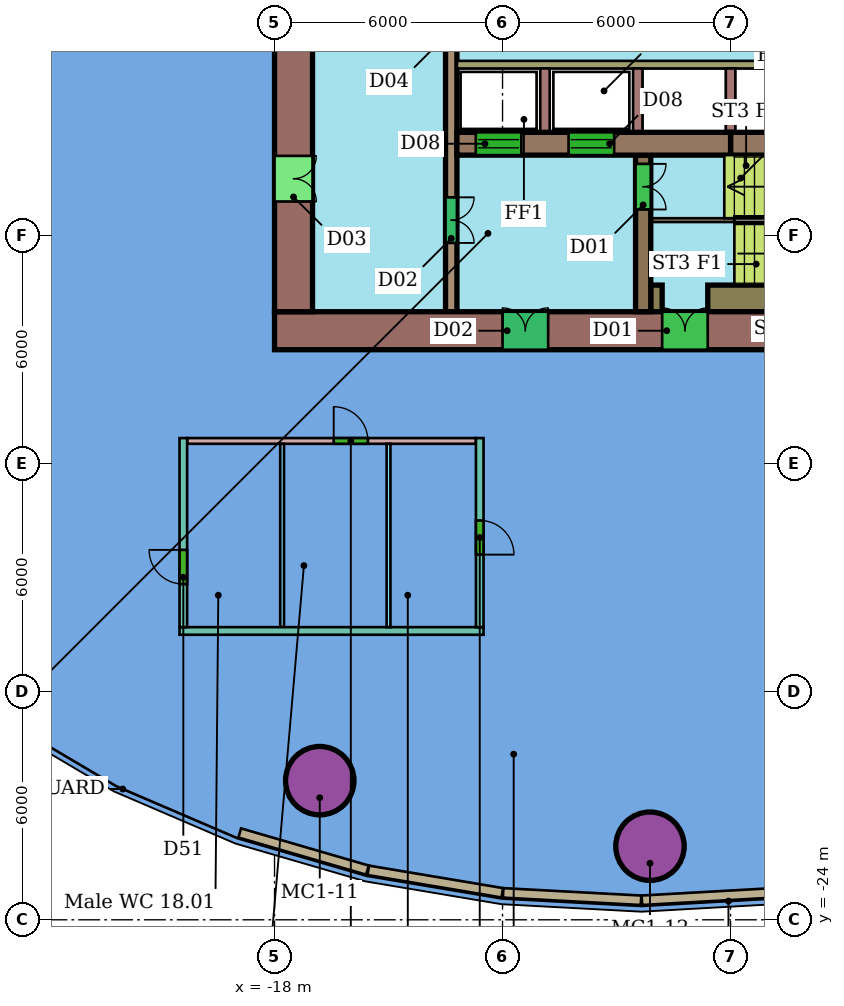
"""IFC4 building model, lengths in metres.
Left out: names, types, materials, properties, quantities, classifications, styles, units other than length and angle.
Written with IfcOpenShell. Run it as: python <this file> out.ifc"""

import sys

from ifc_helpers import new_model, si_unit, direction, frame, frame_2d, origin, origin_2d, place, context, subcontext, project, spatial, rectangle, hollow_circle, extrude, element, fill, save


model = new_model("IFC4")
c1 = context("Model", 3, precision=1e-05, world=origin(), true_north=direction((0.0, 1.0)))
c2 = subcontext(c1, "Body", "Model", "MODEL_VIEW")
j1 = project(units=[si_unit("LENGTHUNIT", "METRE"), si_unit("PLANEANGLEUNIT", "RADIAN")], contexts=[c1])
p1 = place(None, origin())
s1 = spatial("IfcSite", under=j1, at=p1, CompositionType="ELEMENT")
p2 = place(p1, origin())
s2 = spatial("IfcBuilding", under=s1, at=p2, CompositionType="ELEMENT")
p3 = place(p2, frame((0.0, 0.0, 84.1)))
s3 = spatial("IfcBuildingStorey", under=s2, at=p3, CompositionType="ELEMENT", Elevation=84.1)
for number, where, z_axis, x_axis in (
    (1, (-16.81, -20.339, 0.0), (0.0, 0.0, 1.0), (1.0, 0.0, 0.0)),
    (2, (-8.121, -22.064, 0.0), (0.0, 0.0, 1.0), (1.0, 0.0, 0.0)),
):
    element("IfcColumn", number, at=place(p3, frame(where, z_axis=z_axis, x_axis=x_axis)), inside=s3, PredefinedType="COLUMN", context=c2, shape_type="SweptSolid", body=[
        extrude(hollow_circle(Radius=0.9, WallThickness=0.06, at=origin_2d()), origin(), (0.0, 0.0, 1.0), 4.35),
    ])
p4 = place(p3, frame((-20.3, -11.4, 0.0), z_axis=(0.0, 0.0, 1.0), x_axis=(1.0, 0.0, 0.0)))
e3 = element("IfcWall", 3, at=p4, inside=s3, PredefinedType="PARTITIONING", context=c2, shape_type="SweptSolid", body=[
    extrude(rectangle(XDim=7.6, YDim=0.15, at=frame_2d((3.8, 0.0))), origin(), (0.0, 0.0, 1.0), 3.65),
])
p5 = place(p4, frame((3.857, 0.0, 0.0)))
e4 = element("IfcOpeningElement", 4, at=p5, cuts=e3, PredefinedType="OPENING", context=c2, shape_type="SweptSolid", body=[
    extrude(rectangle(XDim=0.9, YDim=2.1, at=frame_2d((0.45, 1.05))), frame((0.0, 0.085, 0.0), z_axis=(0.0, -1.0, 0.0), x_axis=(1.0, 0.0, 0.0)), (0.0, 0.0, 1.0), 0.17),
])
p6 = place(p3, frame((-17.8, -16.3, 0.0), z_axis=(0.0, 0.0, 1.0), x_axis=(0.0, 1.0, 0.0)))
e5 = element("IfcWall", 5, at=p6, inside=s3, PredefinedType="PARTITIONING", context=c2, shape_type="SweptSolid", body=[
    extrude(rectangle(XDim=4.825, YDim=0.1, at=frame_2d((2.413, 0.0))), origin(), (0.0, 0.0, 1.0), 3.65),
])
p7 = place(p3, frame((-20.5, -16.4, 0.0), z_axis=(0.0, 0.0, 1.0), x_axis=(1.0, 0.0, 0.0)))
e6 = element("IfcWall", 6, at=p7, inside=s3, PredefinedType="PARTITIONING", context=c2, shape_type="SweptSolid", body=[
    extrude(rectangle(XDim=8.0, YDim=0.2, at=frame_2d((4.0, 0.0))), origin(), (0.0, 0.0, 1.0), 3.65),
])
p8 = place(p3, frame((-20.4, -16.3, 0.0), z_axis=(0.0, 0.0, 1.0), x_axis=(0.0, 1.0, 0.0)))
e7 = element("IfcWall", 7, at=p8, inside=s3, PredefinedType="PARTITIONING", context=c2, shape_type="SweptSolid", body=[
    extrude(rectangle(XDim=4.975, YDim=0.2, at=frame_2d((2.488, 0.0))), origin(), (0.0, 0.0, 1.0), 3.65),
])
p9 = place(p8, frame((1.133, 0.0, 0.0)))
e8 = element("IfcOpeningElement", 8, at=p9, cuts=e7, PredefinedType="OPENING", context=c2, shape_type="SweptSolid", body=[
    extrude(rectangle(XDim=0.9, YDim=2.1, at=frame_2d((0.45, 1.05))), frame((0.0, 0.11, 0.0), z_axis=(0.0, -1.0, 0.0), x_axis=(1.0, 0.0, 0.0)), (0.0, 0.0, 1.0), 0.22),
])
p10 = place(p3, frame((-15.0, -16.3, 0.0), z_axis=(0.0, 0.0, 1.0), x_axis=(0.0, 1.0, 0.0)))
e9 = element("IfcWall", 9, at=p10, inside=s3, PredefinedType="PARTITIONING", context=c2, shape_type="SweptSolid", body=[
    extrude(rectangle(XDim=4.825, YDim=0.1, at=frame_2d((2.413, 0.0))), origin(), (0.0, 0.0, 1.0), 3.65),
])
p11 = place(p3, frame((-12.6, -11.325, 0.0), z_axis=(0.0, 0.0, 1.0), x_axis=(0.0, -1.0, 0.0)))
e10 = element("IfcWall", 10, at=p11, inside=s3, PredefinedType="PARTITIONING", context=c2, shape_type="SweptSolid", body=[
    extrude(rectangle(XDim=4.975, YDim=0.2, at=frame_2d((2.488, 0.0))), origin(), (0.0, 0.0, 1.0), 3.65),
])
p12 = place(p11, frame((2.167, 0.0, 0.0)))
e11 = element("IfcOpeningElement", 11, at=p12, cuts=e10, PredefinedType="OPENING", context=c2, shape_type="SweptSolid", body=[
    extrude(rectangle(XDim=0.9, YDim=2.1, at=frame_2d((0.45, 1.05))), frame((0.0, 0.11, 0.0), z_axis=(0.0, -1.0, 0.0), x_axis=(1.0, 0.0, 0.0)), (0.0, 0.0, 1.0), 0.22),
])
p13 = place(p3, frame((-18.915, -21.715, 0.0), z_axis=(0.0, 0.0, 1.0), x_axis=(0.960188833613, -0.279351756401, 0.0)))
e12 = element("IfcWall", 12, at=p13, inside=s3, PredefinedType="SOLIDWALL", context=c2, shape_type="SweptSolid", body=[
    extrude(rectangle(XDim=3.5, YDim=0.25, at=frame_2d((1.75, 0.0))), origin(), (0.0, 0.0, 1.0), 3.95),
])
p14 = place(p3, frame((-15.532, -22.698, 0.0), z_axis=(0.0, 0.0, 1.0), x_axis=(0.986227312358, -0.165395551207, 0.0)))
e13 = element("IfcWall", 13, at=p14, inside=s3, PredefinedType="SOLIDWALL", context=c2, shape_type="SweptSolid", body=[
    extrude(rectangle(XDim=3.575, YDim=0.25, at=frame_2d((1.788, 0.0))), origin(), (0.0, 0.0, 1.0), 3.95),
])
p15 = place(p3, frame((-11.985, -23.292, 0.0), z_axis=(0.0, 0.0, 1.0), x_axis=(0.998569925552, -0.053461236262, 0.0)))
e14 = element("IfcWall", 14, at=p15, inside=s3, PredefinedType="SOLIDWALL", context=c2, shape_type="SweptSolid", body=[
    extrude(rectangle(XDim=3.635, YDim=0.25, at=frame_2d((1.817, 0.0))), origin(), (0.0, 0.0, 1.0), 3.95),
])
p16 = place(p3, frame((-8.333, -23.486, 0.0), z_axis=(0.0, 0.0, 1.0), x_axis=(0.998420665682, 0.056179839253, 0.0)))
e15 = element("IfcWall", 15, at=p16, inside=s3, PredefinedType="SOLIDWALL", context=c2, shape_type="SweptSolid", body=[
    extrude(rectangle(XDim=3.677, YDim=0.25, at=frame_2d((1.838, 0.0))), origin(), (0.0, 0.0, 1.0), 3.95),
])
p17 = place(p3, frame((-18.0, -8.5, 0.0), z_axis=(0.0, 0.0, 1.0), x_axis=(1.0, 0.0, 0.0)))
e16 = element("IfcWall", 16, at=p17, inside=s3, PredefinedType="SHEAR", context=c2, shape_type="SweptSolid", body=[
    extrude(rectangle(XDim=24.0, YDim=1.0, at=frame_2d((12.0, 0.0))), origin(), (0.0, 0.0, 1.0), 4.2),
])
p18 = place(p17, frame((10.2, 0.0, 0.0)))
e17 = element("IfcOpeningElement", 17, at=p18, cuts=e16, PredefinedType="OPENING", context=c2, shape_type="SweptSolid", body=[
    extrude(rectangle(XDim=1.2, YDim=2.1, at=frame_2d((0.6, 1.05))), frame((0.0, 0.51, 0.0), z_axis=(0.0, -1.0, 0.0), x_axis=(1.0, 0.0, 0.0)), (0.0, 0.0, 1.0), 1.02),
])
p19 = place(p17, frame((6.0, 0.0, 0.0)))
e18 = element("IfcOpeningElement", 18, at=p19, cuts=e16, PredefinedType="OPENING", context=c2, shape_type="SweptSolid", body=[
    extrude(rectangle(XDim=1.2, YDim=2.1, at=frame_2d((0.6, 1.05))), frame((0.0, 0.51, 0.0), z_axis=(0.0, -1.0, 0.0), x_axis=(1.0, 0.0, 0.0)), (0.0, 0.0, 1.0), 1.02),
])
p20 = place(p3, frame((-17.5, 8.0, 0.0), z_axis=(0.0, 0.0, 1.0), x_axis=(0.0, -1.0, 0.0)))
e19 = element("IfcWall", 19, at=p20, inside=s3, PredefinedType="SHEAR", context=c2, shape_type="SweptSolid", body=[
    extrude(rectangle(XDim=16.0, YDim=1.0, at=frame_2d((8.0, 0.0))), origin(), (0.0, 0.0, 1.0), 4.2),
])
p21 = place(p20, frame((11.9, 0.0, 0.0)))
e20 = element("IfcOpeningElement", 20, at=p21, cuts=e19, PredefinedType="OPENING", context=c2, shape_type="SweptSolid", body=[
    extrude(rectangle(XDim=1.2, YDim=2.1, at=frame_2d((0.6, 1.05))), frame((0.0, 0.51, 0.0), z_axis=(0.0, -1.0, 0.0), x_axis=(1.0, 0.0, 0.0)), (0.0, 0.0, 1.0), 1.02),
])
p22 = place(p20, frame((2.9, 0.0, 0.0)))
e21 = element("IfcOpeningElement", 21, at=p22, cuts=e19, PredefinedType="OPENING", context=c2, shape_type="SweptSolid", body=[
    extrude(rectangle(XDim=1.2, YDim=2.1, at=frame_2d((0.6, 1.05))), frame((0.0, 0.51, 0.0), z_axis=(0.0, -1.0, 0.0), x_axis=(1.0, 0.0, 0.0)), (0.0, 0.0, 1.0), 1.02),
])
p23 = place(p3, frame((-13.2, -3.58, 0.0), z_axis=(0.0, 0.0, 1.0), x_axis=(1.0, 0.0, 0.0)))
e22 = element("IfcWall", 22, at=p23, inside=s3, PredefinedType="SHEAR", context=c2, shape_type="SweptSolid", body=[
    extrude(rectangle(XDim=7.2, YDim=0.6, at=frame_2d((3.6, 0.0))), origin(), (0.0, 0.0, 1.0), 4.2),
])
p24 = place(p23, frame((0.496, 0.0, 0.0)))
e23 = element("IfcOpeningElement", 23, at=p24, cuts=e22, PredefinedType="OPENING", context=c2, shape_type="SweptSolid", body=[
    extrude(rectangle(XDim=1.2, YDim=2.1, at=frame_2d((0.6, 1.05))), frame((0.0, 0.31, 0.0), z_axis=(0.0, -1.0, 0.0), x_axis=(1.0, 0.0, 0.0)), (0.0, 0.0, 1.0), 0.62),
])
p25 = place(p23, frame((2.938, 0.0, 0.0)))
e24 = element("IfcOpeningElement", 24, at=p25, cuts=e22, PredefinedType="OPENING", context=c2, shape_type="SweptSolid", body=[
    extrude(rectangle(XDim=1.2, YDim=2.1, at=frame_2d((0.6, 1.05))), frame((0.0, 0.31, 0.0), z_axis=(0.0, -1.0, 0.0), x_axis=(1.0, 0.0, 0.0)), (0.0, 0.0, 1.0), 0.62),
])
p26 = place(p3, frame((-6.0, -3.58, 0.0), z_axis=(0.0, 0.0, 1.0), x_axis=(1.0, 0.0, 0.0)))
e25 = element("IfcWall", 25, at=p26, inside=s3, PredefinedType="SHEAR", context=c2, shape_type="SweptSolid", body=[
    extrude(rectangle(XDim=7.2, YDim=0.6, at=frame_2d((3.6, 0.0))), origin(), (0.0, 0.0, 1.0), 4.2),
])
p27 = place(p3, frame((-13.35, 8.0, 0.0), z_axis=(0.0, 0.0, 1.0), x_axis=(0.0, -1.0, 0.0)))
e26 = element("IfcWall", 26, at=p27, inside=s3, PredefinedType="SHEAR", context=c2, shape_type="SweptSolid", body=[
    extrude(rectangle(XDim=16.0, YDim=0.3, at=frame_2d((8.0, 0.0))), origin(), (0.0, 0.0, 1.0), 4.2),
])
p28 = place(p27, frame((2.69, 0.0, 0.0)))
e27 = element("IfcOpeningElement", 27, at=p28, cuts=e26, PredefinedType="OPENING", context=c2, shape_type="SweptSolid", body=[
    extrude(rectangle(XDim=1.2, YDim=2.1, at=frame_2d((0.6, 1.05))), frame((0.0, 0.16, 0.0), z_axis=(0.0, -1.0, 0.0), x_axis=(1.0, 0.0, 0.0)), (0.0, 0.0, 1.0), 0.32),
])
p29 = place(p27, frame((12.99, 0.0, 0.0)))
e28 = element("IfcOpeningElement", 28, at=p29, cuts=e26, PredefinedType="OPENING", context=c2, shape_type="SweptSolid", body=[
    extrude(rectangle(XDim=1.2, YDim=2.1, at=frame_2d((0.6, 1.05))), frame((0.0, 0.16, 0.0), z_axis=(0.0, -1.0, 0.0), x_axis=(1.0, 0.0, 0.0)), (0.0, 0.0, 1.0), 0.32),
])
p30 = place(p27, frame((7.25, 0.0, 0.0)))
e29 = element("IfcOpeningElement", 29, at=p30, cuts=e26, PredefinedType="OPENING", context=c2, shape_type="SweptSolid", body=[
    extrude(rectangle(XDim=1.5, YDim=2.1, at=frame_2d((0.75, 1.05))), frame((0.0, 0.16, 0.0), z_axis=(0.0, -1.0, 0.0), x_axis=(1.0, 0.0, 0.0)), (0.0, 0.0, 1.0), 0.32),
])
p31 = place(p3, frame((1.2, -1.5, 0.0), z_axis=(0.0, 0.0, 1.0), x_axis=(-1.0, 0.0, 0.0)))
e30 = element("IfcWall", 30, at=p31, inside=s3, PredefinedType="SHEAR", context=c2, shape_type="SweptSolid", body=[
    extrude(rectangle(XDim=14.4, YDim=0.2, at=frame_2d((7.2, 0.0))), origin(), (0.0, 0.0, 1.0), 4.2),
])
p32 = place(p31, frame((0.15, 0.0, 0.0)))
e31 = element("IfcOpeningElement", 31, at=p32, cuts=e30, PredefinedType="OPENING", context=c2, shape_type="SweptSolid", body=[
    extrude(rectangle(XDim=1.0, YDim=2.1, at=frame_2d((0.5, 1.05))), frame((0.0, 0.11, 0.0), z_axis=(0.0, -1.0, 0.0), x_axis=(1.0, 0.0, 0.0)), (0.0, 0.0, 1.0), 0.22),
])
p33 = place(p3, frame((-8.3, -3.88, 0.0), z_axis=(0.0, 0.0, 1.0), x_axis=(0.0, -1.0, 0.0)))
e32 = element("IfcWall", 32, at=p33, inside=s3, PredefinedType="SHEAR", context=c2, shape_type="SweptSolid", body=[
    extrude(rectangle(XDim=4.12, YDim=0.4, at=frame_2d((2.06, 0.0))), origin(), (0.0, 0.0, 1.0), 4.2),
])
p34 = place(p33, frame((0.23, 0.0, 0.0)))
e33 = element("IfcOpeningElement", 33, at=p34, cuts=e32, PredefinedType="OPENING", context=c2, shape_type="SweptSolid", body=[
    extrude(rectangle(XDim=1.2, YDim=2.1, at=frame_2d((0.6, 1.05))), frame((0.0, 0.21, 0.0), z_axis=(0.0, -1.0, 0.0), x_axis=(1.0, 0.0, 0.0)), (0.0, 0.0, 1.0), 0.42),
])
p35 = place(p3, frame((-8.1, -7.65, 0.0), z_axis=(0.0, 0.0, 1.0), x_axis=(1.0, 0.0, 0.0)))
e34 = element("IfcWall", 34, at=p35, inside=s3, PredefinedType="SHEAR", context=c2, shape_type="SweptSolid", body=[
    extrude(rectangle(XDim=0.3, YDim=0.7, at=frame_2d((0.15, 0.0))), origin(), (0.0, 0.0, 1.0), 4.2),
])
p36 = place(p3, frame((-6.6, -7.65, 0.0), z_axis=(0.0, 0.0, 1.0), x_axis=(1.0, 0.0, 0.0)))
e35 = element("IfcWall", 35, at=p36, inside=s3, PredefinedType="SHEAR", context=c2, shape_type="SweptSolid", body=[
    extrude(rectangle(XDim=5.55, YDim=0.7, at=frame_2d((2.775, 0.0))), origin(), (0.0, 0.0, 1.0), 4.2),
])
p37 = place(p3, frame((-8.1, -5.59, 0.0), z_axis=(0.0, 0.0, 1.0), x_axis=(1.0, 0.0, 0.0)))
e36 = element("IfcWall", 36, at=p37, inside=s3, PredefinedType="SHEAR", context=c2, shape_type="SweptSolid", body=[
    extrude(rectangle(XDim=2.2, YDim=0.1, at=frame_2d((1.1, 0.0))), origin(), (0.0, 0.0, 1.0), 4.2),
])
for number, where, z_axis, x_axis in (
    (37, (-10.883, -1.6, 0.0), (0.0, 0.0, 1.0), (0.0, -1.0, 0.0)),
    (38, (-8.442, -1.6, 0.0), (0.0, 0.0, 1.0), (0.0, -1.0, 0.0)),
    (39, (-6.0, -1.6, 0.0), (0.0, 0.0, 1.0), (0.0, -1.0, 0.0)),
):
    element("IfcWall", number, at=place(p3, frame(where, z_axis=z_axis, x_axis=x_axis)), inside=s3, PredefinedType="SHEAR", context=c2, shape_type="SweptSolid", body=[
        extrude(rectangle(XDim=1.68, YDim=0.25, at=frame_2d((0.84, 0.0))), origin(), (0.0, 0.0, 1.0), 4.2),
    ])
p38 = place(p5, origin())
e40 = element("IfcDoor", 40, at=p38, inside=s3, OperationType="SINGLE_SWING_LEFT", PredefinedType="DOOR", context=c2, shape_type="SweptSolid", body=[
    extrude(rectangle(XDim=0.9, YDim=2.1, at=frame_2d((0.45, 1.05))), frame((0.0, 0.025, 0.0), z_axis=(0.0, -1.0, 0.0), x_axis=(1.0, 0.0, 0.0)), (0.0, 0.0, 1.0), 0.05),
])
fill(e4, e40)
p39 = place(p9, origin())
e41 = element("IfcDoor", 41, at=p39, inside=s3, OperationType="SINGLE_SWING_RIGHT", PredefinedType="DOOR", context=c2, shape_type="SweptSolid", body=[
    extrude(rectangle(XDim=0.9, YDim=2.1, at=frame_2d((0.45, 1.05))), frame((0.0, 0.025, 0.0), z_axis=(0.0, -1.0, 0.0), x_axis=(1.0, 0.0, 0.0)), (0.0, 0.0, 1.0), 0.05),
])
fill(e8, e41)
p40 = place(p12, origin())
e42 = element("IfcDoor", 42, at=p40, inside=s3, OperationType="SINGLE_SWING_RIGHT", PredefinedType="DOOR", context=c2, shape_type="SweptSolid", body=[
    extrude(rectangle(XDim=0.9, YDim=2.1, at=frame_2d((0.45, 1.05))), frame((0.0, 0.025, 0.0), z_axis=(0.0, -1.0, 0.0), x_axis=(1.0, 0.0, 0.0)), (0.0, 0.0, 1.0), 0.05),
])
fill(e11, e42)
p41 = place(p18, origin())
e43 = element("IfcDoor", 43, at=p41, inside=s3, OperationType="DOUBLE_DOOR_SINGLE_SWING", PredefinedType="NOTDEFINED", context=c2, shape_type="SweptSolid", body=[
    extrude(rectangle(XDim=1.2, YDim=2.1, at=frame_2d((0.6, 1.05))), frame((0.0, 0.025, 0.0), z_axis=(0.0, -1.0, 0.0), x_axis=(1.0, 0.0, 0.0)), (0.0, 0.0, 1.0), 0.05),
])
fill(e17, e43)
p42 = place(p19, origin())
e44 = element("IfcDoor", 44, at=p42, inside=s3, OperationType="DOUBLE_DOOR_SINGLE_SWING", PredefinedType="NOTDEFINED", context=c2, shape_type="SweptSolid", body=[
    extrude(rectangle(XDim=1.2, YDim=2.1, at=frame_2d((0.6, 1.05))), frame((0.0, 0.025, 0.0), z_axis=(0.0, -1.0, 0.0), x_axis=(1.0, 0.0, 0.0)), (0.0, 0.0, 1.0), 0.05),
])
fill(e18, e44)
p43 = place(p21, origin())
e45 = element("IfcDoor", 45, at=p43, inside=s3, OperationType="DOUBLE_DOOR_SINGLE_SWING", PredefinedType="NOTDEFINED", context=c2, shape_type="SweptSolid", body=[
    extrude(rectangle(XDim=1.2, YDim=2.1, at=frame_2d((0.6, 1.05))), frame((0.0, 0.025, 0.0), z_axis=(0.0, -1.0, 0.0), x_axis=(1.0, 0.0, 0.0)), (0.0, 0.0, 1.0), 0.05),
])
fill(e20, e45)
p44 = place(p24, origin())
e46 = element("IfcDoor", 46, at=p44, inside=s3, OperationType="DOUBLE_DOOR_SLIDING", PredefinedType="NOTDEFINED", context=c2, shape_type="SweptSolid", body=[
    extrude(rectangle(XDim=1.2, YDim=2.1, at=frame_2d((0.6, 1.05))), frame((0.0, 0.025, 0.0), z_axis=(0.0, -1.0, 0.0), x_axis=(1.0, 0.0, 0.0)), (0.0, 0.0, 1.0), 0.05),
])
fill(e23, e46)
p45 = place(p25, origin())
e47 = element("IfcDoor", 47, at=p45, inside=s3, OperationType="DOUBLE_DOOR_SLIDING", PredefinedType="NOTDEFINED", context=c2, shape_type="SweptSolid", body=[
    extrude(rectangle(XDim=1.2, YDim=2.1, at=frame_2d((0.6, 1.05))), frame((0.0, 0.025, 0.0), z_axis=(0.0, -1.0, 0.0), x_axis=(1.0, 0.0, 0.0)), (0.0, 0.0, 1.0), 0.05),
])
fill(e24, e47)
p46 = place(p29, origin())
e48 = element("IfcDoor", 48, at=p46, inside=s3, OperationType="DOUBLE_DOOR_SINGLE_SWING", PredefinedType="NOTDEFINED", context=c2, shape_type="SweptSolid", body=[
    extrude(rectangle(XDim=1.2, YDim=2.1, at=frame_2d((0.6, 1.05))), frame((0.0, 0.025, 0.0), z_axis=(0.0, -1.0, 0.0), x_axis=(1.0, 0.0, 0.0)), (0.0, 0.0, 1.0), 0.05),
])
fill(e28, e48)
p47 = place(p34, origin())
e49 = element("IfcDoor", 49, at=p47, inside=s3, OperationType="DOUBLE_DOOR_SINGLE_SWING", PredefinedType="NOTDEFINED", context=c2, shape_type="SweptSolid", body=[
    extrude(rectangle(XDim=1.2, YDim=2.1, at=frame_2d((0.6, 1.05))), frame((0.0, 0.025, 0.0), z_axis=(0.0, -1.0, 0.0), x_axis=(1.0, 0.0, 0.0)), (0.0, 0.0, 1.0), 0.05),
])
fill(e33, e49)
save(model, sys.argv[1])
